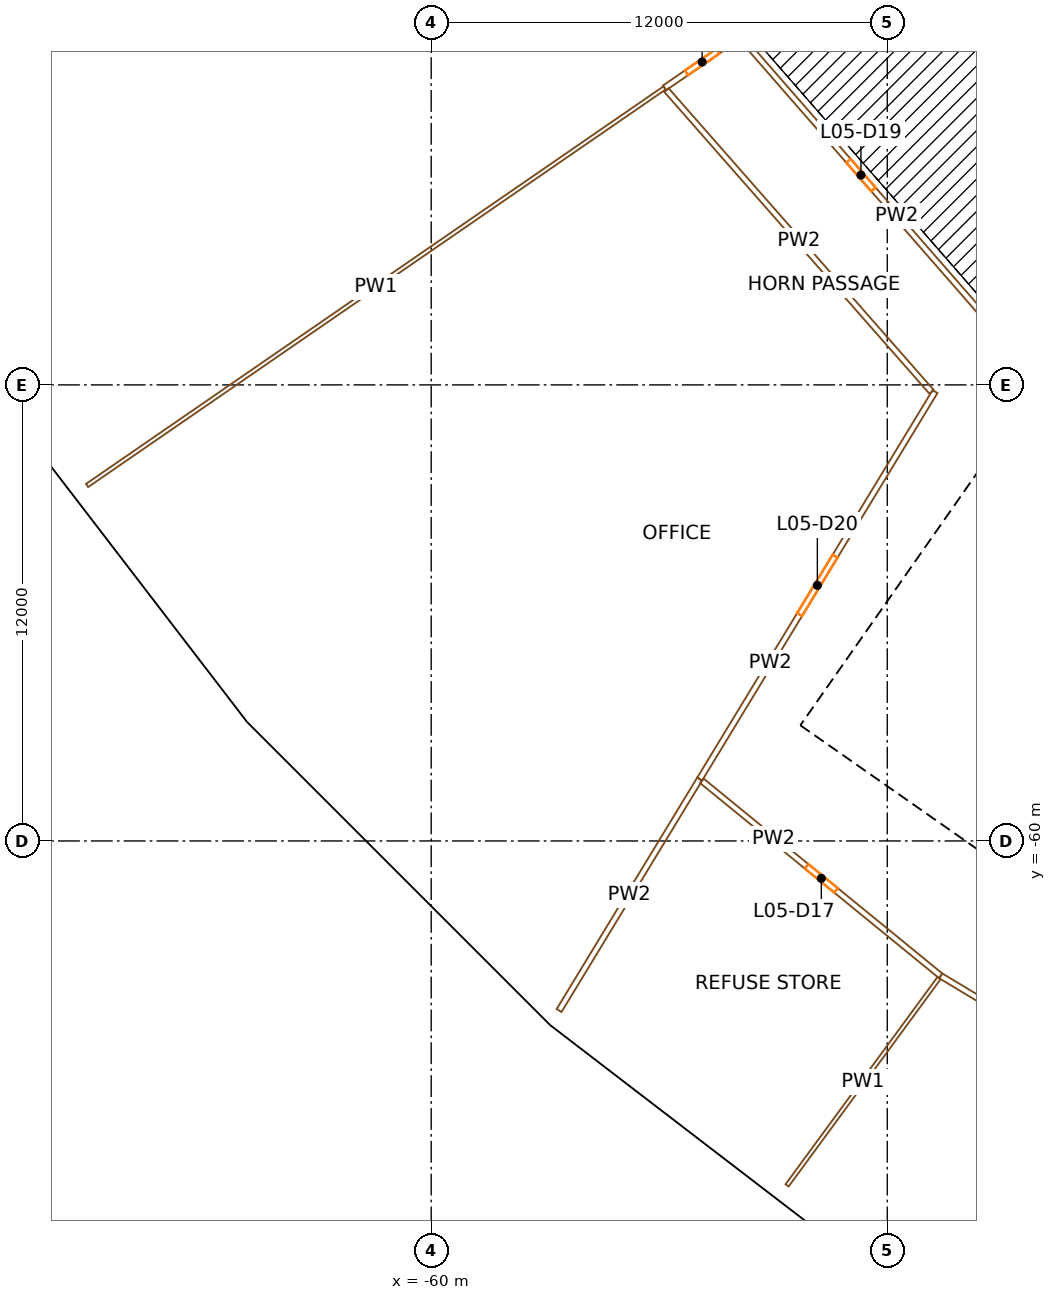
"""IFC4 building model, lengths in metres.
Left out: names, types, materials, properties, quantities, classifications, styles, units other than length and angle.
Written with IfcOpenShell. Run it as: python <this file> out.ifc"""

import sys

from ifc_helpers import new_model, si_unit, direction, frame, frame_2d, origin, origin_2d, place, context, subcontext, project, spatial, rectangle, extrude, element, fill, save


model = new_model("IFC4")
c1 = context("Model", 3, precision=1e-05, world=origin(), true_north=direction((0.0, 1.0)))
c2 = subcontext(c1, "Body", "Model", "MODEL_VIEW")
j1 = project(units=[si_unit("LENGTHUNIT", "METRE"), si_unit("PLANEANGLEUNIT", "RADIAN")], contexts=[c1])
p1 = place(None, origin())
s1 = spatial("IfcSite", under=j1, at=p1, CompositionType="ELEMENT")
p2 = place(p1, origin())
s2 = spatial("IfcBuilding", under=s1, at=p2, CompositionType="ELEMENT")
p3 = place(p2, frame((0.0, 0.0, 36.0)))
s3 = spatial("IfcBuildingStorey", under=s2, at=p3, CompositionType="ELEMENT", Elevation=36.0)
for number, where, z_axis, x_axis in (
    (1, (-64.647, -43.196, 0.0), (0.0, 0.0, 1.0), (0.556, -0.831, 0.0)),
    (2, (-58.456, -51.264, 0.0), (0.0, 0.0, 1.0), (0.659, -0.752, 0.0)),
):
    element("IfcColumn", number, at=place(p3, frame(where, z_axis=z_axis, x_axis=x_axis)), inside=s3, PredefinedType="COLUMN", context=c2, shape_type="SweptSolid", body=[
        extrude(rectangle(XDim=1.4, YDim=1.8, at=origin_2d()), origin(), (0.0, 0.0, 1.0), 4.5),
    ])
p4 = place(p3, frame((-64.094, -56.209, 0.0), z_axis=(0.0, 0.0, 1.0), x_axis=(0.6593458151, -0.751839807479, 0.0)))
e3 = element("IfcColumn", 3, at=p4, inside=s3, PredefinedType="COLUMN", context=c2, shape_type="SweptSolid", body=[
    extrude(rectangle(XDim=1.1, YDim=1.3, at=origin_2d()), origin(), (0.0, 0.0, 1.0), 4.5),
])
p5 = place(p3, frame((-51.264, -58.456, 0.0), z_axis=(0.0, 0.0, 1.0), x_axis=(0.751839807479, -0.6593458151, 0.0)))
e4 = element("IfcColumn", 4, at=p5, inside=s3, PredefinedType="COLUMN", context=c2, shape_type="SweptSolid", body=[
    extrude(rectangle(XDim=1.4, YDim=1.8, at=origin_2d()), origin(), (0.0, 0.0, 1.0), 4.5),
])
p6 = place(p3, frame((-56.209, -64.094, 0.0), z_axis=(0.0, 0.0, 1.0), x_axis=(0.751839807479, -0.6593458151, 0.0)))
e5 = element("IfcColumn", 5, at=p6, inside=s3, PredefinedType="COLUMN", context=c2, shape_type="SweptSolid", body=[
    extrude(rectangle(XDim=1.1, YDim=1.3, at=origin_2d()), origin(), (0.0, 0.0, 1.0), 4.5),
])
p7 = place(p3, frame((-49.779, -57.191, 0.0), z_axis=(0.0, 0.0, 1.0), x_axis=(0.573577477574, 0.819151315216, 0.0)))
e6 = element("IfcWall", 6, at=p7, inside=s3, PredefinedType="SHEAR", context=c2, shape_type="SweptSolid", body=[
    extrude(rectangle(XDim=14.8, YDim=0.9, at=frame_2d((7.4, 0.0))), origin(), (0.0, 0.0, 1.0), 4.2),
])
p8 = place(p7, frame((6.7, 0.0, 0.0)))
e7 = element("IfcOpeningElement", 7, at=p8, cuts=e6, PredefinedType="OPENING", context=c2, shape_type="SweptSolid", body=[
    extrude(rectangle(XDim=1.4, YDim=2.1, at=frame_2d((0.7, 1.05))), frame((0.0, 0.46, 0.0), z_axis=(0.0, -1.0, 0.0), x_axis=(1.0, 0.0, 0.0)), (0.0, 0.0, 1.0), 0.92),
])
p9 = place(p3, frame((-36.827, -65.71, 0.0), z_axis=(0.0, 0.0, 1.0), x_axis=(-0.819153391756, 0.573574511963, 0.0)))
e8 = element("IfcWall", 8, at=p9, inside=s3, PredefinedType="SHEAR", context=c2, shape_type="SweptSolid", body=[
    extrude(rectangle(XDim=15.045, YDim=0.9, at=frame_2d((7.523, 0.0))), origin(), (0.0, 0.0, 1.0), 4.2),
])
p10 = place(p9, frame((0.6, 0.0, 0.0)))
e9 = element("IfcOpeningElement", 9, at=p10, cuts=e8, PredefinedType="OPENING", context=c2, shape_type="SweptSolid", body=[
    extrude(rectangle(XDim=1.0, YDim=2.1, at=frame_2d((0.5, 1.05))), frame((0.0, 0.46, 0.0), z_axis=(0.0, -1.0, 0.0), x_axis=(1.0, 0.0, 0.0)), (0.0, 0.0, 1.0), 0.92),
])
p11 = place(p9, frame((3.275, 0.0, 0.0)))
e10 = element("IfcOpeningElement", 10, at=p11, cuts=e8, PredefinedType="OPENING", context=c2, shape_type="SweptSolid", body=[
    extrude(rectangle(XDim=1.0, YDim=2.1, at=frame_2d((0.5, 1.05))), frame((0.0, 0.46, 0.0), z_axis=(0.0, -1.0, 0.0), x_axis=(1.0, 0.0, 0.0)), (0.0, 0.0, 1.0), 0.92),
])
p12 = place(p9, frame((6.175, 0.0, 0.0)))
e11 = element("IfcOpeningElement", 11, at=p12, cuts=e8, PredefinedType="OPENING", context=c2, shape_type="SweptSolid", body=[
    extrude(rectangle(XDim=1.0, YDim=2.1, at=frame_2d((0.5, 1.05))), frame((0.0, 0.46, 0.0), z_axis=(0.0, -1.0, 0.0), x_axis=(1.0, 0.0, 0.0)), (0.0, 0.0, 1.0), 0.92),
])
p13 = place(p9, frame((13.495, 0.0, 0.0)))
e12 = element("IfcOpeningElement", 12, at=p13, cuts=e8, PredefinedType="OPENING", context=c2, shape_type="SweptSolid", body=[
    extrude(rectangle(XDim=1.1, YDim=2.1, at=frame_2d((0.55, 1.05))), frame((0.0, 0.46, 0.0), z_axis=(0.0, -1.0, 0.0), x_axis=(1.0, 0.0, 0.0)), (0.0, 0.0, 1.0), 0.92),
])
p14 = place(p3, frame((-41.262, -57.661, 0.0), z_axis=(0.0, 0.0, 1.0), x_axis=(-0.819164398642, 0.573558792102, 0.0)))
e13 = element("IfcWall", 13, at=p14, inside=s3, PredefinedType="SOLIDWALL", context=c2, shape_type="SweptSolid", body=[
    extrude(rectangle(XDim=6.795, YDim=0.3, at=frame_2d((3.397, 0.0))), origin(), (0.0, 0.0, 1.0), 4.2),
])
p15 = place(p14, frame((5.32, 0.0, 0.0)))
e14 = element("IfcOpeningElement", 14, at=p15, cuts=e13, PredefinedType="OPENING", context=c2, shape_type="SweptSolid", body=[
    extrude(rectangle(XDim=1.1, YDim=2.1, at=frame_2d((0.55, 1.05))), frame((0.0, 0.16, 0.0), z_axis=(0.0, -1.0, 0.0), x_axis=(1.0, 0.0, 0.0)), (0.0, 0.0, 1.0), 0.32),
])
p16 = place(p3, frame((-71.491, -47.839, 0.0), z_axis=(0.0, 0.0, 1.0), x_axis=(0.608758773695, -0.793355377778, 0.0)))
e15 = element("IfcWall", 15, at=p16, inside=s3, PredefinedType="SOLIDWALL", context=c2, shape_type="SweptSolid", body=[
    extrude(rectangle(XDim=11.135, YDim=0.45, at=frame_2d((5.567, 0.0))), origin(), (0.0, 0.0, 1.0), 3.2),
])
p17 = place(p16, frame((3.917, 0.0, 0.9)))
e16 = element("IfcOpeningElement", 16, at=p17, cuts=e15, PredefinedType="OPENING", context=c2, shape_type="SweptSolid", body=[
    extrude(rectangle(XDim=1.2, YDim=2.15, at=frame_2d((0.6, 1.075))), frame((0.0, 0.235, 0.0), z_axis=(0.0, -1.0, 0.0), x_axis=(1.0, 0.0, 0.0)), (0.0, 0.0, 1.0), 0.47),
])
p18 = place(p16, frame((6.017, 0.0, 0.9)))
e17 = element("IfcOpeningElement", 17, at=p18, cuts=e15, PredefinedType="OPENING", context=c2, shape_type="SweptSolid", body=[
    extrude(rectangle(XDim=1.2, YDim=2.15, at=frame_2d((0.6, 1.075))), frame((0.0, 0.235, 0.0), z_axis=(0.0, -1.0, 0.0), x_axis=(1.0, 0.0, 0.0)), (0.0, 0.0, 1.0), 0.47),
])
p19 = place(p3, frame((-64.698, -56.699, 0.0), z_axis=(0.0, 0.0, 1.0), x_axis=(0.707106781187, -0.707106781187, 0.0)))
e18 = element("IfcWall", 18, at=p19, inside=s3, PredefinedType="SOLIDWALL", context=c2, shape_type="SweptSolid", body=[
    extrude(rectangle(XDim=11.312, YDim=0.45, at=frame_2d((5.656, 0.0))), origin(), (0.0, 0.0, 1.0), 3.2),
])
p20 = place(p19, frame((4.006, 0.0, 0.9)))
e19 = element("IfcOpeningElement", 19, at=p20, cuts=e18, PredefinedType="OPENING", context=c2, shape_type="SweptSolid", body=[
    extrude(rectangle(XDim=1.2, YDim=2.15, at=frame_2d((0.6, 1.075))), frame((0.0, 0.235, 0.0), z_axis=(0.0, -1.0, 0.0), x_axis=(1.0, 0.0, 0.0)), (0.0, 0.0, 1.0), 0.47),
])
p21 = place(p19, frame((6.106, 0.0, 0.9)))
e20 = element("IfcOpeningElement", 20, at=p21, cuts=e18, PredefinedType="OPENING", context=c2, shape_type="SweptSolid", body=[
    extrude(rectangle(XDim=1.2, YDim=2.15, at=frame_2d((0.6, 1.075))), frame((0.0, 0.235, 0.0), z_axis=(0.0, -1.0, 0.0), x_axis=(1.0, 0.0, 0.0)), (0.0, 0.0, 1.0), 0.47),
])
p22 = place(p3, frame((-56.673, -64.713, 0.0), z_axis=(0.0, 0.0, 1.0), x_axis=(0.793355377778, -0.608758773695, 0.0)))
e21 = element("IfcWall", 21, at=p22, inside=s3, PredefinedType="SOLIDWALL", context=c2, shape_type="SweptSolid", body=[
    extrude(rectangle(XDim=11.135, YDim=0.45, at=frame_2d((5.567, 0.0))), origin(), (0.0, 0.0, 1.0), 3.2),
])
p23 = place(p22, frame((3.917, 0.0, 0.9)))
e22 = element("IfcOpeningElement", 22, at=p23, cuts=e21, PredefinedType="OPENING", context=c2, shape_type="SweptSolid", body=[
    extrude(rectangle(XDim=1.2, YDim=2.15, at=frame_2d((0.6, 1.075))), frame((0.0, 0.235, 0.0), z_axis=(0.0, -1.0, 0.0), x_axis=(1.0, 0.0, 0.0)), (0.0, 0.0, 1.0), 0.47),
])
p24 = place(p22, frame((6.017, 0.0, 0.9)))
e23 = element("IfcOpeningElement", 23, at=p24, cuts=e21, PredefinedType="OPENING", context=c2, shape_type="SweptSolid", body=[
    extrude(rectangle(XDim=1.2, YDim=2.15, at=frame_2d((0.6, 1.075))), frame((0.0, 0.235, 0.0), z_axis=(0.0, -1.0, 0.0), x_axis=(1.0, 0.0, 0.0)), (0.0, 0.0, 1.0), 0.47),
])
p25 = place(p3, frame((-69.054, -50.646, 0.0), z_axis=(0.0, 0.0, 1.0), x_axis=(0.82368687208, 0.567044916002, 0.0)))
e24 = element("IfcWall", 24, at=p25, inside=s3, PredefinedType="PARTITIONING", context=c2, shape_type="SweptSolid", body=[
    extrude(rectangle(XDim=18.447, YDim=0.1, at=frame_2d((9.223, 0.0))), origin(), (0.0, 0.0, 1.0), 3.1),
])
p26 = place(p3, frame((-53.86, -40.186, 0.0), z_axis=(0.0, 0.0, 1.0), x_axis=(0.823653203434, 0.567093819815, 0.0)))
e25 = element("IfcWall", 25, at=p26, inside=s3, PredefinedType="PARTITIONING", context=c2, shape_type="SweptSolid", body=[
    extrude(rectangle(XDim=2.402, YDim=0.15, at=frame_2d((1.201, 0.0))), origin(), (0.0, 0.0, 1.0), 3.1),
])
p27 = place(p26, frame((0.701, 0.0, 0.0)))
e26 = element("IfcOpeningElement", 26, at=p27, cuts=e25, PredefinedType="OPENING", context=c2, shape_type="SweptSolid", body=[
    extrude(rectangle(XDim=1.0, YDim=2.1, at=frame_2d((0.5, 1.05))), frame((0.0, 0.085, 0.0), z_axis=(0.0, -1.0, 0.0), x_axis=(1.0, 0.0, 0.0)), (0.0, 0.0, 1.0), 0.17),
])
p28 = place(p3, frame((-52.936, -58.372, 0.0), z_axis=(0.0, 0.0, 1.0), x_axis=(-0.519148894699, -0.854683815883, 0.0)))
e27 = element("IfcWall", 27, at=p28, inside=s3, PredefinedType="PARTITIONING", context=c2, shape_type="SweptSolid", body=[
    extrude(rectangle(XDim=7.125, YDim=0.15, at=frame_2d((3.563, 0.0))), origin(), (0.0, 0.0, 1.0), 3.1),
])
p29 = place(p3, frame((-46.594, -63.549, 0.0), z_axis=(0.0, 0.0, 1.0), x_axis=(-0.774664810718, 0.632372066931, 0.0)))
e28 = element("IfcWall", 28, at=p29, inside=s3, PredefinedType="PARTITIONING", context=c2, shape_type="SweptSolid", body=[
    extrude(rectangle(XDim=8.112, YDim=0.15, at=frame_2d((4.056, 0.0))), origin(), (0.0, 0.0, 1.0), 3.1),
])
p30 = place(p29, frame((3.556, 0.0, 0.0)))
e29 = element("IfcOpeningElement", 29, at=p30, cuts=e28, PredefinedType="OPENING", context=c2, shape_type="SweptSolid", body=[
    extrude(rectangle(XDim=1.0, YDim=2.1, at=frame_2d((0.5, 1.05))), frame((0.0, 0.085, 0.0), z_axis=(0.0, -1.0, 0.0), x_axis=(1.0, 0.0, 0.0)), (0.0, 0.0, 1.0), 0.17),
])
p31 = place(p3, frame((-50.635, -69.062, 0.0), z_axis=(0.0, 0.0, 1.0), x_axis=(0.591304174152, 0.806448618097, 0.0)))
e30 = element("IfcWall", 30, at=p31, inside=s3, PredefinedType="PARTITIONING", context=c2, shape_type="SweptSolid", body=[
    extrude(rectangle(XDim=6.761, YDim=0.1, at=frame_2d((3.38, 0.0))), origin(), (0.0, 0.0, 1.0), 3.1),
])
p32 = place(p3, frame((-46.832, -48.185, 0.0), z_axis=(0.0, 0.0, 1.0), x_axis=(-0.6600545931, 0.75121763433, 0.0)))
e31 = element("IfcWall", 31, at=p32, inside=s3, PredefinedType="PARTITIONING", context=c2, shape_type="SweptSolid", body=[
    extrude(rectangle(XDim=10.573, YDim=0.15, at=frame_2d((5.287, 0.0))), origin(), (0.0, 0.0, 1.0), 3.1),
])
p33 = place(p3, frame((-52.936, -58.372, 0.0), z_axis=(0.0, 0.0, 1.0), x_axis=(0.519168806698, 0.854671720693, 0.0)))
e32 = element("IfcWall", 32, at=p33, inside=s3, PredefinedType="PARTITIONING", context=c2, shape_type="SweptSolid", body=[
    extrude(rectangle(XDim=11.927, YDim=0.15, at=frame_2d((5.964, 0.0))), origin(), (0.0, 0.0, 1.0), 3.1),
])
p34 = place(p33, frame((5.064, 0.0, 0.0)))
e33 = element("IfcOpeningElement", 33, at=p34, cuts=e32, PredefinedType="OPENING", context=c2, shape_type="SweptSolid", body=[
    extrude(rectangle(XDim=1.8, YDim=2.1, at=frame_2d((0.9, 1.05))), frame((0.0, 0.085, 0.0), z_axis=(0.0, -1.0, 0.0), x_axis=(1.0, 0.0, 0.0)), (0.0, 0.0, 1.0), 0.17),
])
p35 = place(p3, frame((-34.337, -70.916, 0.0), z_axis=(0.0, 0.0, 1.0), x_axis=(-0.857079893963, 0.515183516199, 0.0)))
e34 = element("IfcWall", 34, at=p35, inside=s3, PredefinedType="PARTITIONING", context=c2, shape_type="SweptSolid", body=[
    extrude(rectangle(XDim=14.3, YDim=0.15, at=frame_2d((7.15, 0.0))), origin(), (0.0, 0.0, 1.0), 3.1),
])
p36 = place(p35, frame((6.65, 0.0, 0.0)))
e35 = element("IfcOpeningElement", 35, at=p36, cuts=e34, PredefinedType="OPENING", context=c2, shape_type="SweptSolid", body=[
    extrude(rectangle(XDim=1.0, YDim=2.1, at=frame_2d((0.5, 1.05))), frame((0.0, 0.085, 0.0), z_axis=(0.0, -1.0, 0.0), x_axis=(1.0, 0.0, 0.0)), (0.0, 0.0, 1.0), 0.17),
])
p37 = place(p3, frame((-51.833, -38.881, 0.0), z_axis=(0.0, 0.0, 1.0), x_axis=(0.657411055224, -0.753532152246, 0.0)))
e36 = element("IfcWall", 36, at=p37, inside=s3, PredefinedType="PARTITIONING", context=c2, shape_type="SweptSolid", body=[
    extrude(rectangle(XDim=9.553, YDim=0.15, at=frame_2d((4.776, 0.0))), origin(), (0.0, 0.0, 1.0), 3.1),
])
p38 = place(p37, frame((4.276, 0.0, 0.0)))
e37 = element("IfcOpeningElement", 37, at=p38, cuts=e36, PredefinedType="OPENING", context=c2, shape_type="SweptSolid", body=[
    extrude(rectangle(XDim=1.0, YDim=2.1, at=frame_2d((0.5, 1.05))), frame((0.0, 0.085, 0.0), z_axis=(0.0, -1.0, 0.0), x_axis=(1.0, 0.0, 0.0)), (0.0, 0.0, 1.0), 0.17),
])
p39 = place(p8, origin())
e38 = element("IfcDoor", 38, at=p39, inside=s3, OperationType="DOUBLE_DOOR_SINGLE_SWING", PredefinedType="DOOR", context=c2, shape_type="SweptSolid", body=[
    extrude(rectangle(XDim=1.4, YDim=2.1, at=frame_2d((0.7, 1.05))), frame((0.0, 0.025, 0.0), z_axis=(0.0, -1.0, 0.0), x_axis=(1.0, 0.0, 0.0)), (0.0, 0.0, 1.0), 0.05),
])
fill(e7, e38)
p40 = place(p13, origin())
e39 = element("IfcDoor", 39, at=p40, inside=s3, OperationType="SINGLE_SWING_LEFT", PredefinedType="DOOR", context=c2, shape_type="SweptSolid", body=[
    extrude(rectangle(XDim=1.1, YDim=2.1, at=frame_2d((0.55, 1.05))), frame((0.0, 0.025, 0.0), z_axis=(0.0, -1.0, 0.0), x_axis=(1.0, 0.0, 0.0)), (0.0, 0.0, 1.0), 0.05),
])
fill(e12, e39)
p41 = place(p15, origin())
e40 = element("IfcDoor", 40, at=p41, inside=s3, OperationType="SINGLE_SWING_LEFT", PredefinedType="DOOR", context=c2, shape_type="SweptSolid", body=[
    extrude(rectangle(XDim=1.1, YDim=2.1, at=frame_2d((0.55, 1.05))), frame((0.0, 0.025, 0.0), z_axis=(0.0, -1.0, 0.0), x_axis=(1.0, 0.0, 0.0)), (0.0, 0.0, 1.0), 0.05),
])
fill(e14, e40)
p42 = place(p17, origin())
e41 = element("IfcWindow", 41, at=p42, inside=s3, PartitioningType="SINGLE_PANEL", PredefinedType="WINDOW", context=c2, shape_type="SweptSolid", body=[
    extrude(rectangle(XDim=1.2, YDim=2.15, at=frame_2d((0.6, 1.075))), frame((0.0, 0.03, 0.0), z_axis=(0.0, -1.0, 0.0), x_axis=(1.0, 0.0, 0.0)), (0.0, 0.0, 1.0), 0.06),
])
fill(e16, e41)
p43 = place(p18, origin())
e42 = element("IfcWindow", 42, at=p43, inside=s3, PartitioningType="SINGLE_PANEL", PredefinedType="WINDOW", context=c2, shape_type="SweptSolid", body=[
    extrude(rectangle(XDim=1.2, YDim=2.15, at=frame_2d((0.6, 1.075))), frame((0.0, 0.03, 0.0), z_axis=(0.0, -1.0, 0.0), x_axis=(1.0, 0.0, 0.0)), (0.0, 0.0, 1.0), 0.06),
])
fill(e17, e42)
p44 = place(p20, origin())
e43 = element("IfcWindow", 43, at=p44, inside=s3, PartitioningType="SINGLE_PANEL", PredefinedType="WINDOW", context=c2, shape_type="SweptSolid", body=[
    extrude(rectangle(XDim=1.2, YDim=2.15, at=frame_2d((0.6, 1.075))), frame((0.0, 0.03, 0.0), z_axis=(0.0, -1.0, 0.0), x_axis=(1.0, 0.0, 0.0)), (0.0, 0.0, 1.0), 0.06),
])
fill(e19, e43)
p45 = place(p21, origin())
e44 = element("IfcWindow", 44, at=p45, inside=s3, PartitioningType="SINGLE_PANEL", PredefinedType="WINDOW", context=c2, shape_type="SweptSolid", body=[
    extrude(rectangle(XDim=1.2, YDim=2.15, at=frame_2d((0.6, 1.075))), frame((0.0, 0.03, 0.0), z_axis=(0.0, -1.0, 0.0), x_axis=(1.0, 0.0, 0.0)), (0.0, 0.0, 1.0), 0.06),
])
fill(e20, e44)
p46 = place(p23, origin())
e45 = element("IfcWindow", 45, at=p46, inside=s3, PartitioningType="SINGLE_PANEL", PredefinedType="WINDOW", context=c2, shape_type="SweptSolid", body=[
    extrude(rectangle(XDim=1.2, YDim=2.15, at=frame_2d((0.6, 1.075))), frame((0.0, 0.03, 0.0), z_axis=(0.0, -1.0, 0.0), x_axis=(1.0, 0.0, 0.0)), (0.0, 0.0, 1.0), 0.06),
])
fill(e22, e45)
p47 = place(p24, origin())
e46 = element("IfcWindow", 46, at=p47, inside=s3, PartitioningType="SINGLE_PANEL", PredefinedType="WINDOW", context=c2, shape_type="SweptSolid", body=[
    extrude(rectangle(XDim=1.2, YDim=2.15, at=frame_2d((0.6, 1.075))), frame((0.0, 0.03, 0.0), z_axis=(0.0, -1.0, 0.0), x_axis=(1.0, 0.0, 0.0)), (0.0, 0.0, 1.0), 0.06),
])
fill(e23, e46)
p48 = place(p30, origin())
e47 = element("IfcDoor", 47, at=p48, inside=s3, OperationType="SINGLE_SWING_RIGHT", PredefinedType="DOOR", context=c2, shape_type="SweptSolid", body=[
    extrude(rectangle(XDim=1.0, YDim=2.1, at=frame_2d((0.5, 1.05))), frame((0.0, 0.025, 0.0), z_axis=(0.0, -1.0, 0.0), x_axis=(1.0, 0.0, 0.0)), (0.0, 0.0, 1.0), 0.05),
])
fill(e29, e47)
p49 = place(p38, origin())
e48 = element("IfcDoor", 48, at=p49, inside=s3, OperationType="SINGLE_SWING_RIGHT", PredefinedType="DOOR", context=c2, shape_type="SweptSolid", body=[
    extrude(rectangle(XDim=1.0, YDim=2.1, at=frame_2d((0.5, 1.05))), frame((0.0, 0.025, 0.0), z_axis=(0.0, -1.0, 0.0), x_axis=(1.0, 0.0, 0.0)), (0.0, 0.0, 1.0), 0.05),
])
fill(e37, e48)
p50 = place(p34, origin())
e49 = element("IfcDoor", 49, at=p50, inside=s3, OperationType="DOUBLE_DOOR_SINGLE_SWING", PredefinedType="DOOR", context=c2, shape_type="SweptSolid", body=[
    extrude(rectangle(XDim=1.8, YDim=2.1, at=frame_2d((0.9, 1.05))), frame((0.0, 0.025, 0.0), z_axis=(0.0, -1.0, 0.0), x_axis=(1.0, 0.0, 0.0)), (0.0, 0.0, 1.0), 0.05),
])
fill(e33, e49)
p51 = place(p27, origin())
e50 = element("IfcDoor", 50, at=p51, inside=s3, OperationType="SINGLE_SWING_RIGHT", PredefinedType="DOOR", context=c2, shape_type="SweptSolid", body=[
    extrude(rectangle(XDim=1.0, YDim=2.1, at=frame_2d((0.5, 1.05))), frame((0.0, 0.025, 0.0), z_axis=(0.0, -1.0, 0.0), x_axis=(1.0, 0.0, 0.0)), (0.0, 0.0, 1.0), 0.05),
])
fill(e26, e50)
save(model, sys.argv[1])
